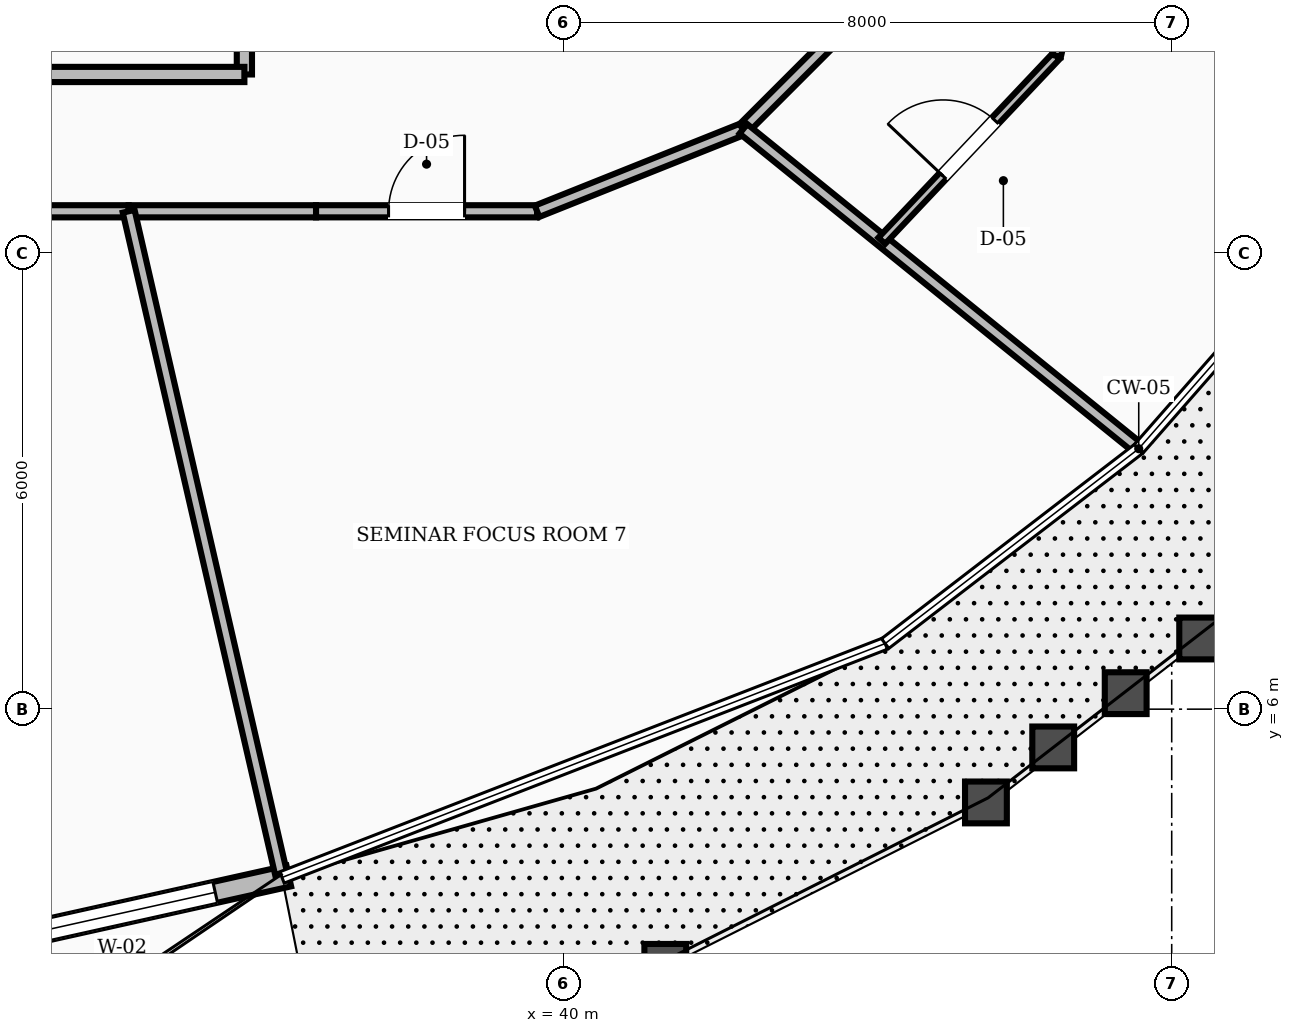
"""IFC4 building model, lengths in metres.
Left out: names, types, materials, properties, quantities, classifications, styles, units other than length and angle.
Written with IfcOpenShell. Run it as: python <this file> out.ifc"""

import sys

from ifc_helpers import new_model, si_unit, direction, frame, frame_2d, origin, place, context, subcontext, project, spatial, rectangle, extrude, element, fill, save


model = new_model("IFC4")
c1 = context("Model", 3, precision=1e-05, world=origin(), true_north=direction((0.0, 1.0)))
c2 = subcontext(c1, "Body", "Model", "MODEL_VIEW")
j1 = project(units=[si_unit("LENGTHUNIT", "METRE"), si_unit("PLANEANGLEUNIT", "RADIAN")], contexts=[c1])
p1 = place(None, origin())
s1 = spatial("IfcSite", under=j1, at=p1, CompositionType="ELEMENT")
p2 = place(p1, origin())
s2 = spatial("IfcBuilding", under=s1, at=p2, CompositionType="ELEMENT")
p3 = place(p2, frame((0.0, 0.0, 229.2)))
s3 = spatial("IfcBuildingStorey", under=s2, at=p3, CompositionType="ELEMENT", Elevation=229.2)
p4 = place(p3, frame((32.0, 2.83, 0.0), z_axis=(0.0, 0.0, 1.0), x_axis=(0.976105143188, 0.217298756193, 0.0)))
e1 = element("IfcWall", 1, at=p4, inside=s3, PredefinedType="STANDARD", context=c2, shape_type="SweptSolid", body=[
    extrude(rectangle(XDim=4.492, YDim=0.28, at=frame_2d((2.246, 0.0))), origin(), (0.0, 0.0, 1.0), 2.88),
])
p5 = place(p4, frame((0.9, 0.0, 0.8)))
e2 = element("IfcOpeningElement", 2, at=p5, cuts=e1, PredefinedType="OPENING", context=c2, shape_type="SweptSolid", body=[
    extrude(rectangle(XDim=2.6, YDim=1.65, at=frame_2d((1.3, 0.825))), frame((0.0, 0.15, 0.0), z_axis=(0.0, -1.0, 0.0), x_axis=(1.0, 0.0, 0.0)), (0.0, 0.0, 1.0), 0.3),
])
p6 = place(p3, frame((35.8, 14.35, 0.0), z_axis=(0.0, 0.0, 1.0), x_axis=(0.0, 1.0, 0.0)))
e3 = element("IfcWall", 3, at=p6, inside=s3, PredefinedType="SOLIDWALL", context=c2, shape_type="SweptSolid", body=[
    extrude(rectangle(XDim=2.2, YDim=0.2, at=frame_2d((1.1, 0.0))), origin(), (0.0, 0.0, 1.0), 2.87),
])
p7 = place(p3, frame((28.2, 14.35, 0.0), z_axis=(0.0, 0.0, 1.0), x_axis=(1.0, 0.0, 0.0)))
e4 = element("IfcWall", 4, at=p7, inside=s3, PredefinedType="SOLIDWALL", context=c2, shape_type="SweptSolid", body=[
    extrude(rectangle(XDim=7.6, YDim=0.2, at=frame_2d((3.8, 0.0))), origin(), (0.0, 0.0, 1.0), 2.87),
])
p8 = place(p7, frame((3.2, 0.0, 0.0)))
e5 = element("IfcOpeningElement", 5, at=p8, cuts=e4, PredefinedType="OPENING", context=c2, shape_type="SweptSolid", body=[
    extrude(rectangle(XDim=1.2, YDim=2.1, at=frame_2d((0.6, 1.05))), frame((0.0, 0.11, 0.0), z_axis=(0.0, -1.0, 0.0), x_axis=(1.0, 0.0, 0.0)), (0.0, 0.0, 1.0), 0.22),
])
p9 = place(p3, frame((32.0, 12.55, 0.0), z_axis=(0.0, 0.0, 1.0), x_axis=(1.0, 0.0, 0.0)))
e6 = element("IfcWall", 6, at=p9, inside=s3, PredefinedType="SOLIDWALL", context=c2, shape_type="SweptSolid", body=[
    extrude(rectangle(XDim=2.278, YDim=0.16, at=frame_2d((1.139, 0.0))), origin(), (0.0, 0.0, 1.0), 2.87),
])
p10 = place(p3, frame((34.278, 12.55, 0.0), z_axis=(0.0, 0.0, 1.0), x_axis=(1.0, 0.0, 0.0)))
e7 = element("IfcWall", 7, at=p10, inside=s3, PredefinedType="SOLIDWALL", context=c2, shape_type="SweptSolid", body=[
    extrude(rectangle(XDim=2.465, YDim=0.16, at=frame_2d((1.232, 0.0))), origin(), (0.0, 0.0, 1.0), 2.87),
])
p11 = place(p3, frame((36.743, 12.55, 0.0), z_axis=(0.0, 0.0, 1.0), x_axis=(1.0, 0.0, 0.0)))
e8 = element("IfcWall", 8, at=p11, inside=s3, PredefinedType="SOLIDWALL", context=c2, shape_type="SweptSolid", body=[
    extrude(rectangle(XDim=2.908, YDim=0.16, at=frame_2d((1.454, 0.0))), origin(), (0.0, 0.0, 1.0), 2.87),
])
p12 = place(p11, frame((0.954, 0.0, 0.0)))
e9 = element("IfcOpeningElement", 9, at=p12, cuts=e8, PredefinedType="OPENING", context=c2, shape_type="SweptSolid", body=[
    extrude(rectangle(XDim=1.0, YDim=2.1, at=frame_2d((0.5, 1.05))), frame((0.0, 0.09, 0.0), z_axis=(0.0, -1.0, 0.0), x_axis=(1.0, 0.0, 0.0)), (0.0, 0.0, 1.0), 0.18),
])
p13 = place(p3, frame((39.651, 12.55, 0.0), z_axis=(0.0, 0.0, 1.0), x_axis=(0.92856882165, 0.371160266542, 0.0)))
e10 = element("IfcWall", 10, at=p13, inside=s3, PredefinedType="SOLIDWALL", context=c2, shape_type="SweptSolid", body=[
    extrude(rectangle(XDim=2.923, YDim=0.16, at=frame_2d((1.461, 0.0))), origin(), (0.0, 0.0, 1.0), 2.87),
])
p14 = place(p3, frame((42.365, 13.635, 0.0), z_axis=(0.0, 0.0, 1.0), x_axis=(0.707106781187, 0.707106781187, 0.0)))
e11 = element("IfcWall", 11, at=p14, inside=s3, PredefinedType="SOLIDWALL", context=c2, shape_type="SweptSolid", body=[
    extrude(rectangle(XDim=2.916, YDim=0.16, at=frame_2d((1.458, 0.0))), origin(), (0.0, 0.0, 1.0), 2.87),
])
p15 = place(p3, frame((42.365, 13.635, 0.0), z_axis=(0.0, 0.0, 1.0), x_axis=(0.777377556826, -0.629034286938, 0.0)))
e12 = element("IfcWall", 12, at=p15, inside=s3, PredefinedType="SOLIDWALL", context=c2, shape_type="SweptSolid", body=[
    extrude(rectangle(XDim=6.641, YDim=0.16, at=frame_2d((3.32, 0.0))), origin(), (0.0, 0.0, 1.0), 2.87),
])
p16 = place(p3, frame((44.185, 12.162, 0.0), z_axis=(0.0, 0.0, 1.0), x_axis=(0.686726331668, 0.726916051132, 0.0)))
e13 = element("IfcWall", 13, at=p16, inside=s3, PredefinedType="PARTITIONING", context=c2, shape_type="SweptSolid", body=[
    extrude(rectangle(XDim=3.347, YDim=0.12, at=frame_2d((1.674, 0.0))), origin(), (0.0, 0.0, 1.0), 2.87),
])
p17 = place(p16, frame((1.174, 0.0, 0.0)))
e14 = element("IfcOpeningElement", 14, at=p17, cuts=e13, PredefinedType="OPENING", context=c2, shape_type="SweptSolid", body=[
    extrude(rectangle(XDim=1.0, YDim=2.1, at=frame_2d((0.5, 1.05))), frame((0.0, 0.07, 0.0), z_axis=(0.0, -1.0, 0.0), x_axis=(1.0, 0.0, 0.0)), (0.0, 0.0, 1.0), 0.14),
])
p18 = place(p3, frame((46.484, 14.595, 0.0), z_axis=(0.0, 0.0, 1.0), x_axis=(0.221671233184, 0.975121461346, 0.0)))
e15 = element("IfcWall", 15, at=p18, inside=s3, PredefinedType="PARTITIONING", context=c2, shape_type="SweptSolid", body=[
    extrude(rectangle(XDim=3.368, YDim=0.12, at=frame_2d((1.684, 0.0))), origin(), (0.0, 0.0, 1.0), 2.87),
])
p19 = place(p3, frame((34.278, 12.55, 0.0), z_axis=(0.0, 0.0, 1.0), x_axis=(0.224283288053, -0.974523989802, 0.0)))
e16 = element("IfcWall", 16, at=p19, inside=s3, PredefinedType="SOLIDWALL", context=c2, shape_type="SweptSolid", body=[
    extrude(rectangle(XDim=8.943, YDim=0.16, at=frame_2d((4.472, 0.0))), origin(), (0.0, 0.0, 1.0), 2.87),
])
p20 = place(p5, origin())
e17 = element("IfcWindow", 17, at=p20, inside=s3, PartitioningType="SINGLE_PANEL", PredefinedType="WINDOW", context=c2, shape_type="SweptSolid", body=[
    extrude(rectangle(XDim=2.6, YDim=1.65, at=frame_2d((1.3, 0.825))), frame((0.0, 0.03, 0.0), z_axis=(0.0, -1.0, 0.0), x_axis=(1.0, 0.0, 0.0)), (0.0, 0.0, 1.0), 0.06),
])
fill(e2, e17)
p21 = place(p17, origin())
e18 = element("IfcDoor", 18, at=p21, inside=s3, OperationType="SINGLE_SWING_LEFT", PredefinedType="DOOR", context=c2, shape_type="SweptSolid", body=[
    extrude(rectangle(XDim=1.0, YDim=2.1, at=frame_2d((0.5, 1.05))), frame((0.0, 0.025, 0.0), z_axis=(0.0, -1.0, 0.0), x_axis=(1.0, 0.0, 0.0)), (0.0, 0.0, 1.0), 0.05),
])
fill(e14, e18)
p22 = place(p12, origin())
e19 = element("IfcDoor", 19, at=p22, inside=s3, OperationType="SINGLE_SWING_RIGHT", PredefinedType="DOOR", context=c2, shape_type="SweptSolid", body=[
    extrude(rectangle(XDim=1.0, YDim=2.1, at=frame_2d((0.5, 1.05))), frame((0.0, 0.025, 0.0), z_axis=(0.0, -1.0, 0.0), x_axis=(1.0, 0.0, 0.0)), (0.0, 0.0, 1.0), 0.05),
])
fill(e9, e19)
save(model, sys.argv[1])
